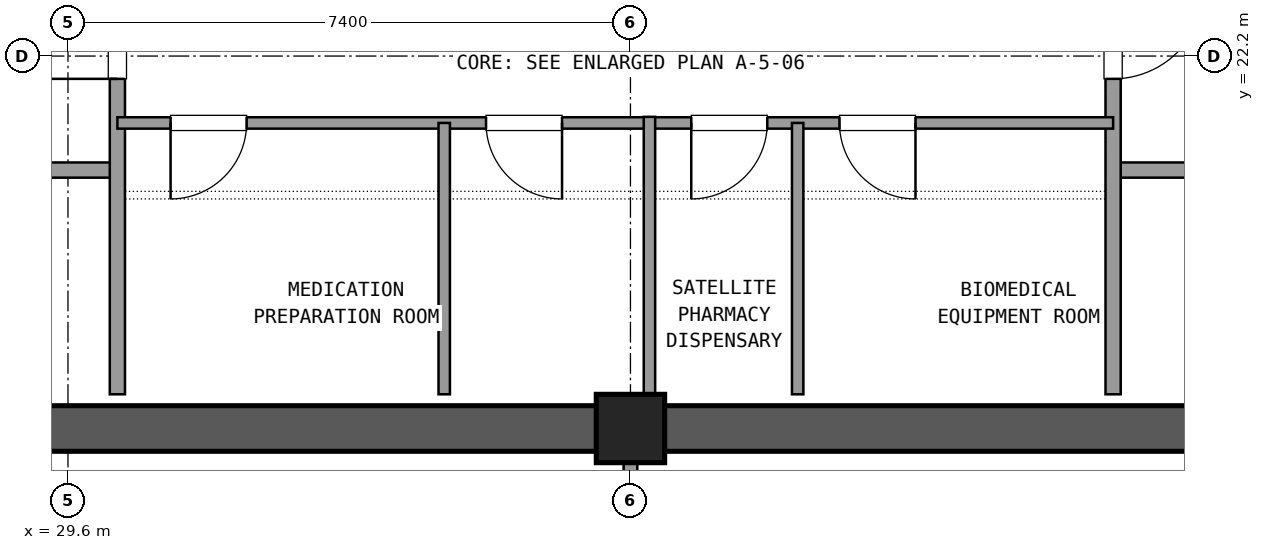
"""IFC4 building model, lengths in metres.
Left out: names, types, materials, properties, quantities, classifications, styles, units other than length and angle.
Written with IfcOpenShell. Run it as: python <this file> out.ifc"""

import sys

from ifc_helpers import new_model, si_unit, direction, frame, frame_2d, origin, origin_2d, place, context, subcontext, project, spatial, rectangle, extrude, element, fill, save


model = new_model("IFC4")
c1 = context("Model", 3, precision=1e-05, world=origin(), true_north=direction((0.0, 1.0)))
c2 = subcontext(c1, "Body", "Model", "MODEL_VIEW")
j1 = project(units=[si_unit("LENGTHUNIT", "METRE"), si_unit("PLANEANGLEUNIT", "RADIAN")], contexts=[c1])
p1 = place(None, origin())
s1 = spatial("IfcSite", under=j1, at=p1, CompositionType="ELEMENT")
p2 = place(p1, origin())
s2 = spatial("IfcBuilding", under=s1, at=p2, CompositionType="ELEMENT")
p3 = place(p2, frame((0.0, 0.0, 207.18)))
s3 = spatial("IfcBuildingStorey", under=s2, at=p3, CompositionType="ELEMENT", Elevation=207.18)
p4 = place(p3, frame((37.0, 17.3, 0.0), z_axis=(0.0, 0.0, 1.0), x_axis=(1.0, 0.0, 0.0)))
e1 = element("IfcColumn", 1, at=p4, inside=s3, PredefinedType="COLUMN", context=c2, shape_type="SweptSolid", body=[
    extrude(rectangle(XDim=0.9, YDim=0.9, at=origin_2d()), origin(), (0.0, 0.0, 1.0), 3.6),
])
for number, where, z_axis, x_axis in (
    (2, (26.245, 17.3, 0.0), (0.0, 0.0, 1.0), (1.0, 0.0, 0.0)),
    (3, (37.445, 17.3, 0.0), (0.0, 0.0, 1.0), (1.0, 0.0, 0.0)),
):
    element("IfcWall", number, at=place(p3, frame(where, z_axis=z_axis, x_axis=x_axis)), inside=s3, PredefinedType="SHEAR", context=c2, shape_type="SweptSolid", body=[
        extrude(rectangle(XDim=10.31, YDim=0.6, at=frame_2d((5.155, 0.0))), origin(), (0.0, 0.0, 1.0), 3.32),
    ])
p5 = place(p3, frame((26.25, 20.7, 0.0), z_axis=(0.0, 0.0, 1.0), x_axis=(1.0, 0.0, 0.0)))
e4 = element("IfcWall", 4, at=p5, inside=s3, PredefinedType="SOLIDWALL", context=c2, shape_type="SweptSolid", body=[
    extrude(rectangle(XDim=4.0, YDim=0.2, at=frame_2d((2.0, 0.0))), origin(), (0.0, 0.0, 1.0), 2.61),
])
p6 = place(p5, frame((0.65, 0.0, 0.0)))
e5 = element("IfcOpeningElement", 5, at=p6, cuts=e4, PredefinedType="OPENING", context=c2, shape_type="SweptSolid", body=[
    extrude(rectangle(XDim=1.2, YDim=2.15, at=frame_2d((0.6, 1.075))), frame((0.0, 0.11, 0.0), z_axis=(0.0, -1.0, 0.0), x_axis=(1.0, 0.0, 0.0)), (0.0, 0.0, 1.0), 0.22),
])
p7 = place(p3, frame((30.25, 17.75, 0.0), z_axis=(0.0, 0.0, 1.0), x_axis=(0.0, 1.0, 0.0)))
e6 = element("IfcWall", 6, at=p7, inside=s3, PredefinedType="SOLIDWALL", context=c2, shape_type="SweptSolid", body=[
    extrude(rectangle(XDim=6.9, YDim=0.2, at=frame_2d((3.45, 0.0))), origin(), (0.0, 0.0, 1.0), 2.61),
])
p8 = place(p7, frame((4.15, 0.0, 0.0)))
e7 = element("IfcOpeningElement", 7, at=p8, cuts=e6, PredefinedType="OPENING", context=c2, shape_type="SweptSolid", body=[
    extrude(rectangle(XDim=1.2, YDim=2.15, at=frame_2d((0.6, 1.075))), frame((0.0, 0.11, 0.0), z_axis=(0.0, -1.0, 0.0), x_axis=(1.0, 0.0, 0.0)), (0.0, 0.0, 1.0), 0.22),
])
p9 = place(p3, frame((43.35, 20.7, 0.0), z_axis=(0.0, 0.0, 1.0), x_axis=(1.0, 0.0, 0.0)))
e8 = element("IfcWall", 8, at=p9, inside=s3, PredefinedType="SOLIDWALL", context=c2, shape_type="SweptSolid", body=[
    extrude(rectangle(XDim=4.4, YDim=0.2, at=frame_2d((2.2, 0.0))), origin(), (0.0, 0.0, 1.0), 2.61),
])
p10 = place(p9, frame((2.35, 0.0, 0.0)))
e9 = element("IfcOpeningElement", 9, at=p10, cuts=e8, PredefinedType="OPENING", context=c2, shape_type="SweptSolid", body=[
    extrude(rectangle(XDim=1.2, YDim=2.15, at=frame_2d((0.6, 1.075))), frame((0.0, 0.11, 0.0), z_axis=(0.0, -1.0, 0.0), x_axis=(1.0, 0.0, 0.0)), (0.0, 0.0, 1.0), 0.22),
])
p11 = place(p3, frame((43.35, 17.75, 0.0), z_axis=(0.0, 0.0, 1.0), x_axis=(0.0, 1.0, 0.0)))
e10 = element("IfcWall", 10, at=p11, inside=s3, PredefinedType="SOLIDWALL", context=c2, shape_type="SweptSolid", body=[
    extrude(rectangle(XDim=6.9, YDim=0.2, at=frame_2d((3.45, 0.0))), origin(), (0.0, 0.0, 1.0), 2.61),
])
p12 = place(p11, frame((4.15, 0.0, 0.0)))
e11 = element("IfcOpeningElement", 11, at=p12, cuts=e10, PredefinedType="OPENING", context=c2, shape_type="SweptSolid", body=[
    extrude(rectangle(XDim=1.2, YDim=2.15, at=frame_2d((0.6, 1.075))), frame((0.0, 0.11, 0.0), z_axis=(0.0, -1.0, 0.0), x_axis=(1.0, 0.0, 0.0)), (0.0, 0.0, 1.0), 0.22),
])
p13 = place(p3, frame((30.25, 21.32, 0.0), z_axis=(0.0, 0.0, 1.0), x_axis=(1.0, 0.0, 0.0)))
e12 = element("IfcWall", 12, at=p13, inside=s3, PredefinedType="PARTITIONING", context=c2, shape_type="SweptSolid", body=[
    extrude(rectangle(XDim=7.0, YDim=0.15, at=frame_2d((3.5, 0.0))), origin(), (0.0, 0.0, 1.0), 2.61),
])
p14 = place(p13, frame((0.7, 0.0, 0.0)))
e13 = element("IfcOpeningElement", 13, at=p14, cuts=e12, PredefinedType="OPENING", context=c2, shape_type="SweptSolid", body=[
    extrude(rectangle(XDim=1.0, YDim=2.15, at=frame_2d((0.5, 1.075))), frame((0.0, 0.085, 0.0), z_axis=(0.0, -1.0, 0.0), x_axis=(1.0, 0.0, 0.0)), (0.0, 0.0, 1.0), 0.17),
])
p15 = place(p13, frame((4.85, 0.0, 0.0)))
e14 = element("IfcOpeningElement", 14, at=p15, cuts=e12, PredefinedType="OPENING", context=c2, shape_type="SweptSolid", body=[
    extrude(rectangle(XDim=1.0, YDim=2.15, at=frame_2d((0.5, 1.075))), frame((0.0, 0.085, 0.0), z_axis=(0.0, -1.0, 0.0), x_axis=(1.0, 0.0, 0.0)), (0.0, 0.0, 1.0), 0.17),
])
p16 = place(p3, frame((34.55, 17.75, 0.0), z_axis=(0.0, 0.0, 1.0), x_axis=(0.0, 1.0, 0.0)))
e15 = element("IfcWall", 15, at=p16, inside=s3, PredefinedType="PARTITIONING", context=c2, shape_type="SweptSolid", body=[
    extrude(rectangle(XDim=3.57, YDim=0.15, at=frame_2d((1.785, 0.0))), origin(), (0.0, 0.0, 1.0), 2.61),
])
p17 = place(p3, frame((37.25, 21.32, 0.0), z_axis=(0.0, 0.0, 1.0), x_axis=(1.0, 0.0, 0.0)))
e16 = element("IfcWall", 16, at=p17, inside=s3, PredefinedType="PARTITIONING", context=c2, shape_type="SweptSolid", body=[
    extrude(rectangle(XDim=6.1, YDim=0.15, at=frame_2d((3.05, 0.0))), origin(), (0.0, 0.0, 1.0), 2.61),
])
p18 = place(p17, frame((0.55, 0.0, 0.0)))
e17 = element("IfcOpeningElement", 17, at=p18, cuts=e16, PredefinedType="OPENING", context=c2, shape_type="SweptSolid", body=[
    extrude(rectangle(XDim=1.0, YDim=2.15, at=frame_2d((0.5, 1.075))), frame((0.0, 0.085, 0.0), z_axis=(0.0, -1.0, 0.0), x_axis=(1.0, 0.0, 0.0)), (0.0, 0.0, 1.0), 0.17),
])
p19 = place(p17, frame((2.5, 0.0, 0.0)))
e18 = element("IfcOpeningElement", 18, at=p19, cuts=e16, PredefinedType="OPENING", context=c2, shape_type="SweptSolid", body=[
    extrude(rectangle(XDim=1.0, YDim=2.15, at=frame_2d((0.5, 1.075))), frame((0.0, 0.085, 0.0), z_axis=(0.0, -1.0, 0.0), x_axis=(1.0, 0.0, 0.0)), (0.0, 0.0, 1.0), 0.17),
])
p20 = place(p3, frame((39.2, 17.75, 0.0), z_axis=(0.0, 0.0, 1.0), x_axis=(0.0, 1.0, 0.0)))
e19 = element("IfcWall", 19, at=p20, inside=s3, PredefinedType="PARTITIONING", context=c2, shape_type="SweptSolid", body=[
    extrude(rectangle(XDim=3.57, YDim=0.15, at=frame_2d((1.785, 0.0))), origin(), (0.0, 0.0, 1.0), 2.61),
])
p21 = place(p3, frame((37.25, 17.75, 0.0), z_axis=(0.0, 0.0, 1.0), x_axis=(0.0, 1.0, 0.0)))
e20 = element("IfcWall", 20, at=p21, inside=s3, PredefinedType="PARTITIONING", context=c2, shape_type="SweptSolid", body=[
    extrude(rectangle(XDim=3.65, YDim=0.15, at=frame_2d((1.825, 0.0))), origin(), (0.0, 0.0, 1.0), 2.61),
])
p22 = place(p3, frame((37.0, 14.15, 0.0), z_axis=(0.0, 0.0, 1.0), x_axis=(0.0, 1.0, 0.0)))
e21 = element("IfcWall", 21, at=p22, inside=s3, PredefinedType="PARTITIONING", context=c2, shape_type="SweptSolid", body=[
    extrude(rectangle(XDim=2.7, YDim=0.18, at=frame_2d((1.35, 0.0))), origin(), (0.0, 0.0, 1.0), 2.61),
])
p23 = place(p22, frame((0.35, 0.0, 0.0)))
e22 = element("IfcOpeningElement", 22, at=p23, cuts=e21, PredefinedType="OPENING", context=c2, shape_type="SweptSolid", body=[
    extrude(rectangle(XDim=2.0, YDim=2.2, at=frame_2d((1.0, 1.1))), frame((0.0, 0.1, 0.0), z_axis=(0.0, -1.0, 0.0), x_axis=(1.0, 0.0, 0.0)), (0.0, 0.0, 1.0), 0.2),
])
p24 = place(p8, origin())
e23 = element("IfcDoor", 23, at=p24, inside=s3, OperationType="SINGLE_SWING_LEFT", PredefinedType="DOOR", context=c2, shape_type="SweptSolid", body=[
    extrude(rectangle(XDim=1.2, YDim=2.15, at=frame_2d((0.6, 1.075))), frame((0.0, 0.025, 0.0), z_axis=(0.0, -1.0, 0.0), x_axis=(1.0, 0.0, 0.0)), (0.0, 0.0, 1.0), 0.05),
])
fill(e7, e23)
p25 = place(p12, frame((1.2, 0.0, 0.0), z_axis=(0.0, 0.0, 1.0), x_axis=(-1.0, 0.0, 0.0)))
e24 = element("IfcDoor", 24, at=p25, inside=s3, OperationType="SINGLE_SWING_RIGHT", PredefinedType="DOOR", context=c2, shape_type="SweptSolid", body=[
    extrude(rectangle(XDim=1.2, YDim=2.15, at=frame_2d((0.6, 1.075))), frame((0.0, 0.025, 0.0), z_axis=(0.0, -1.0, 0.0), x_axis=(1.0, 0.0, 0.0)), (0.0, 0.0, 1.0), 0.05),
])
fill(e11, e24)
p26 = place(p14, frame((1.0, 0.0, 0.0), z_axis=(0.0, 0.0, 1.0), x_axis=(-1.0, 0.0, 0.0)))
e25 = element("IfcDoor", 25, at=p26, inside=s3, OperationType="SINGLE_SWING_LEFT", PredefinedType="DOOR", context=c2, shape_type="SweptSolid", body=[
    extrude(rectangle(XDim=1.0, YDim=2.15, at=frame_2d((0.5, 1.075))), frame((0.0, 0.025, 0.0), z_axis=(0.0, -1.0, 0.0), x_axis=(1.0, 0.0, 0.0)), (0.0, 0.0, 1.0), 0.05),
])
fill(e13, e25)
p27 = place(p15, frame((1.0, 0.0, 0.0), z_axis=(0.0, 0.0, 1.0), x_axis=(-1.0, 0.0, 0.0)))
e26 = element("IfcDoor", 26, at=p27, inside=s3, OperationType="SINGLE_SWING_RIGHT", PredefinedType="DOOR", context=c2, shape_type="SweptSolid", body=[
    extrude(rectangle(XDim=1.0, YDim=2.15, at=frame_2d((0.5, 1.075))), frame((0.0, 0.025, 0.0), z_axis=(0.0, -1.0, 0.0), x_axis=(1.0, 0.0, 0.0)), (0.0, 0.0, 1.0), 0.05),
])
fill(e14, e26)
p28 = place(p18, frame((1.0, 0.0, 0.0), z_axis=(0.0, 0.0, 1.0), x_axis=(-1.0, 0.0, 0.0)))
e27 = element("IfcDoor", 27, at=p28, inside=s3, OperationType="SINGLE_SWING_LEFT", PredefinedType="DOOR", context=c2, shape_type="SweptSolid", body=[
    extrude(rectangle(XDim=1.0, YDim=2.15, at=frame_2d((0.5, 1.075))), frame((0.0, 0.025, 0.0), z_axis=(0.0, -1.0, 0.0), x_axis=(1.0, 0.0, 0.0)), (0.0, 0.0, 1.0), 0.05),
])
fill(e17, e27)
p29 = place(p19, frame((1.0, 0.0, 0.0), z_axis=(0.0, 0.0, 1.0), x_axis=(-1.0, 0.0, 0.0)))
e28 = element("IfcDoor", 28, at=p29, inside=s3, OperationType="SINGLE_SWING_RIGHT", PredefinedType="DOOR", context=c2, shape_type="SweptSolid", body=[
    extrude(rectangle(XDim=1.0, YDim=2.15, at=frame_2d((0.5, 1.075))), frame((0.0, 0.025, 0.0), z_axis=(0.0, -1.0, 0.0), x_axis=(1.0, 0.0, 0.0)), (0.0, 0.0, 1.0), 0.05),
])
fill(e18, e28)
save(model, sys.argv[1])
